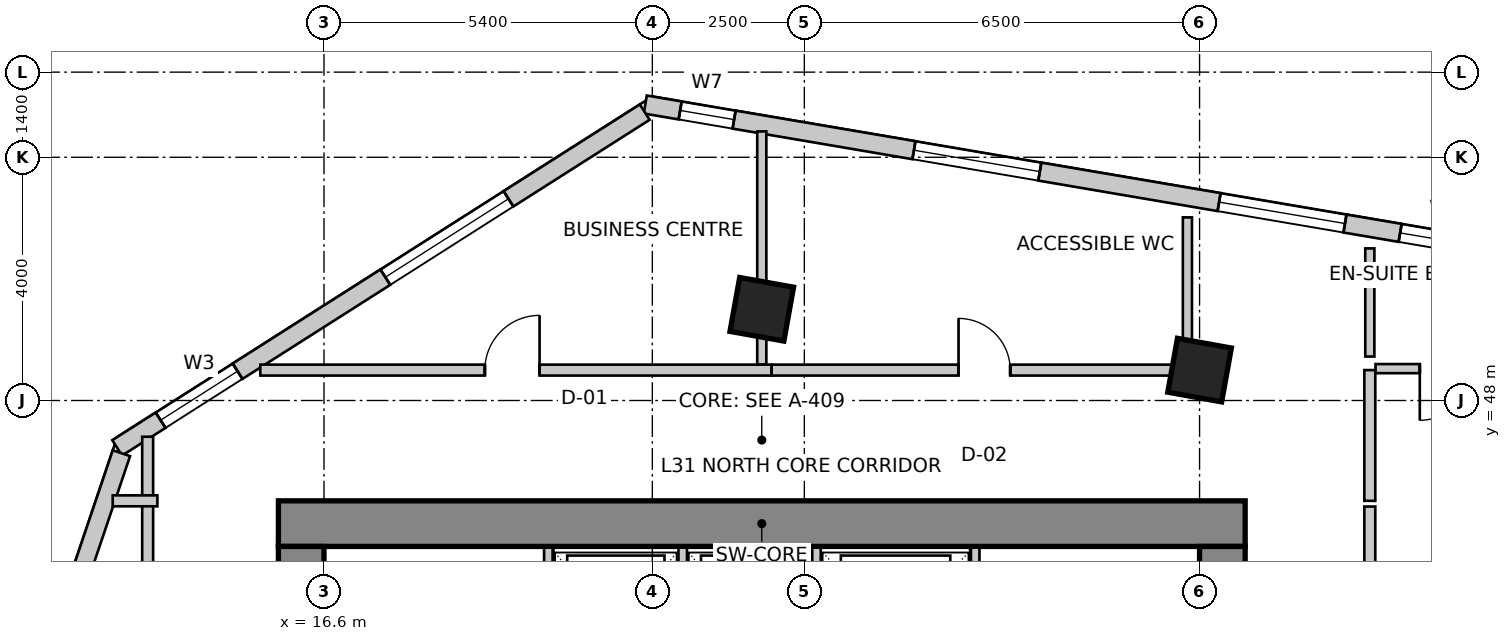
"""IFC4 building model, lengths in metres.
Left out: names, types, materials, properties, quantities, classifications, styles, units other than length and angle.
Written with IfcOpenShell. Run it as: python <this file> out.ifc"""

import sys

from ifc_helpers import new_model, si_unit, direction, frame, frame_2d, origin, origin_2d, place, context, subcontext, project, spatial, rectangle, extrude, source, transform, mapped, element, fill, save


model = new_model("IFC4")
c1 = context("Model", 3, precision=1e-05, world=origin(), true_north=direction((0.0, 1.0)))
c2 = subcontext(c1, "Body", "Model", "MODEL_VIEW")
j1 = project(units=[si_unit("LENGTHUNIT", "METRE"), si_unit("PLANEANGLEUNIT", "RADIAN")], contexts=[c1])
p1 = place(None, origin())
s1 = spatial("IfcSite", under=j1, at=p1, CompositionType="ELEMENT")
p2 = place(p1, origin())
s2 = spatial("IfcBuilding", under=s1, at=p2, CompositionType="ELEMENT")
p3 = place(p2, frame((0.0, 0.0, 128.6)))
s3 = spatial("IfcBuildingStorey", under=s2, at=p3, CompositionType="ELEMENT", Elevation=128.6)
p4 = place(p3, frame((15.85, 45.975, 0.0), z_axis=(0.0, 0.0, 1.0), x_axis=(1.0, 0.0, 0.0)))
e1 = element("IfcWall", 1, at=p4, inside=s3, PredefinedType="SHEAR", context=c2, shape_type="SweptSolid", body=[
    extrude(rectangle(XDim=15.9, YDim=0.75, at=frame_2d((7.95, 0.0))), origin(), (0.0, 0.0, 1.0), 3.6),
])
p5 = place(p3, frame((16.225, 34.2, 0.0), z_axis=(0.0, 0.0, 1.0), x_axis=(0.0, 1.0, 0.0)))
e2 = element("IfcWall", 2, at=p5, inside=s3, PredefinedType="SHEAR", context=c2, shape_type="SweptSolid", body=[
    extrude(rectangle(XDim=11.4, YDim=0.75, at=frame_2d((5.7, 0.0))), origin(), (0.0, 0.0, 1.0), 3.6),
])
m1 = source(origin(), c2, "Body", "SweptSolid", [
    extrude(rectangle(XDim=1.1, YDim=2.15, at=frame_2d((0.55, 1.075))), frame((0.0, 0.385, 0.0), z_axis=(0.0, -1.0, 0.0), x_axis=(1.0, 0.0, 0.0)), (0.0, 0.0, 1.0), 0.77),
])
p6 = place(p5, frame((7.15, 0.0, 0.0)))
e3 = element("IfcOpeningElement", 3, at=p6, cuts=e2, PredefinedType="OPENING", context=c2, shape_type="MappedRepresentation", body=[
    mapped(m1, transform((0.0, 0.0, 0.0), scale=1.0)),
])
p7 = place(p3, frame((31.375, 34.2, 0.0), z_axis=(0.0, 0.0, 1.0), x_axis=(0.0, 1.0, 0.0)))
e4 = element("IfcWall", 4, at=p7, inside=s3, PredefinedType="SHEAR", context=c2, shape_type="SweptSolid", body=[
    extrude(rectangle(XDim=11.4, YDim=0.75, at=frame_2d((5.7, 0.0))), origin(), (0.0, 0.0, 1.0), 3.6),
])
p8 = place(p7, frame((7.35, 0.0, 0.0)))
e5 = element("IfcOpeningElement", 5, at=p8, cuts=e4, PredefinedType="OPENING", context=c2, shape_type="MappedRepresentation", body=[
    mapped(m1, transform((0.0, 0.0, 0.0), scale=1.0)),
])
m2 = source(origin(), c2, "Body", "SweptSolid", [
    extrude(rectangle(XDim=0.9, YDim=0.9, at=origin_2d()), origin(), (0.0, 0.0, 1.0), 3.6),
])
for number, where, z_axis, x_axis in (
    (6, (23.8, 49.5, 0.0), (0.0, 0.0, 1.0), (0.984, -0.177, 0.0)),
    (7, (31.0, 48.5, 0.0), (0.0, 0.0, 1.0), (0.984, -0.177, 0.0)),
):
    element("IfcColumn", number, at=place(p3, frame(where, z_axis=z_axis, x_axis=x_axis)), inside=s3, PredefinedType="COLUMN", context=c2, shape_type="MappedRepresentation", body=[
        mapped(m2, transform((0.0, 0.0, 0.0), scale=1.0)),
    ])
p9 = place(p3, frame((53.561, 47.48, 0.0), z_axis=(0.0, 0.0, 1.0), x_axis=(-0.985845173895, 0.167658262868, 0.0)))
e8 = element("IfcWall", 8, at=p9, inside=s3, PredefinedType="SOLIDWALL", context=c2, shape_type="SweptSolid", body=[
    extrude(rectangle(XDim=32.132, YDim=0.3, at=frame_2d((16.066, 0.0))), origin(), (0.0, 0.0, 1.0), 3.35),
])
m3 = source(origin(), c2, "Body", "SweptSolid", [
    extrude(rectangle(XDim=2.1, YDim=2.0, at=frame_2d((1.05, 1.0))), frame((0.0, 0.16, 0.0), z_axis=(0.0, -1.0, 0.0), x_axis=(1.0, 0.0, 0.0)), (0.0, 0.0, 1.0), 0.32),
])
p10 = place(p9, frame((1.032, 0.0, 0.85)))
e9 = element("IfcOpeningElement", 9, at=p10, cuts=e8, PredefinedType="OPENING", context=c2, shape_type="MappedRepresentation", body=[
    mapped(m3, transform((0.0, 0.0, 0.0), scale=1.0)),
])
p11 = place(p9, frame((6.836, 0.0, 0.85)))
e10 = element("IfcOpeningElement", 10, at=p11, cuts=e8, PredefinedType="OPENING", context=c2, shape_type="MappedRepresentation", body=[
    mapped(m3, transform((0.0, 0.0, 0.0), scale=1.0)),
])
p12 = place(p9, frame((13.599, 0.0, 0.85)))
e11 = element("IfcOpeningElement", 11, at=p12, cuts=e8, PredefinedType="OPENING", context=c2, shape_type="MappedRepresentation", body=[
    mapped(m3, transform((0.0, 0.0, 0.0), scale=1.0)),
])
m4 = source(origin(), c2, "Body", "SweptSolid", [
    extrude(rectangle(XDim=1.5, YDim=1.8, at=frame_2d((0.75, 0.9))), frame((0.0, 0.16, 0.0), z_axis=(0.0, -1.0, 0.0), x_axis=(1.0, 0.0, 0.0)), (0.0, 0.0, 1.0), 0.32),
])
p13 = place(p9, frame((18.039, 0.0, 0.85)))
e12 = element("IfcOpeningElement", 12, at=p13, cuts=e8, PredefinedType="OPENING", context=c2, shape_type="MappedRepresentation", body=[
    mapped(m4, transform((0.0, 0.0, 0.0), scale=1.0)),
])
p14 = place(p9, frame((20.459, 0.0, 0.85)))
e13 = element("IfcOpeningElement", 13, at=p14, cuts=e8, PredefinedType="OPENING", context=c2, shape_type="MappedRepresentation", body=[
    mapped(m3, transform((0.0, 0.0, 0.0), scale=1.0)),
])
p15 = place(p9, frame((25.55, 0.0, 0.85)))
e14 = element("IfcOpeningElement", 14, at=p15, cuts=e8, PredefinedType="OPENING", context=c2, shape_type="MappedRepresentation", body=[
    mapped(m3, transform((0.0, 0.0, 0.0), scale=1.0)),
])
m5 = source(origin(), c2, "Body", "SweptSolid", [
    extrude(rectangle(XDim=0.9, YDim=1.6, at=frame_2d((0.45, 0.8))), frame((0.0, 0.16, 0.0), z_axis=(0.0, -1.0, 0.0), x_axis=(1.0, 0.0, 0.0)), (0.0, 0.0, 1.0), 0.32),
])
p16 = place(p9, frame((30.65, 0.0, 0.85)))
e15 = element("IfcOpeningElement", 15, at=p16, cuts=e8, PredefinedType="OPENING", context=c2, shape_type="MappedRepresentation", body=[
    mapped(m5, transform((0.0, 0.0, 0.0), scale=1.0)),
])
p17 = place(p3, frame((21.875, 52.742, 0.0), z_axis=(0.0, 0.0, 1.0), x_axis=(-0.843662465249, -0.536873956092, 0.0)))
e16 = element("IfcWall", 16, at=p17, inside=s3, PredefinedType="SOLIDWALL", context=c2, shape_type="SweptSolid", body=[
    extrude(rectangle(XDim=10.284, YDim=0.3, at=frame_2d((5.142, 0.0))), origin(), (0.0, 0.0, 1.0), 3.35),
])
m6 = source(origin(), c2, "Body", "SweptSolid", [
    extrude(rectangle(XDim=2.4, YDim=2.2, at=frame_2d((1.2, 1.1))), frame((0.0, 0.16, 0.0), z_axis=(0.0, -1.0, 0.0), x_axis=(1.0, 0.0, 0.0)), (0.0, 0.0, 1.0), 0.32),
])
p18 = place(p17, frame((2.656, 0.0, 0.85)))
e17 = element("IfcOpeningElement", 17, at=p18, cuts=e16, PredefinedType="OPENING", context=c2, shape_type="MappedRepresentation", body=[
    mapped(m6, transform((0.0, 0.0, 0.0), scale=1.0)),
])
p19 = place(p17, frame((7.937, 0.0, 0.85)))
e18 = element("IfcOpeningElement", 18, at=p19, cuts=e16, PredefinedType="OPENING", context=c2, shape_type="MappedRepresentation", body=[
    mapped(m4, transform((0.0, 0.0, 0.0), scale=1.0)),
])
p20 = place(p3, frame((13.269, 47.134, 0.0), z_axis=(0.0, 0.0, 1.0), x_axis=(-0.319929596295, -0.947441319246, 0.0)))
e19 = element("IfcWall", 19, at=p20, inside=s3, PredefinedType="SOLIDWALL", context=c2, shape_type="SweptSolid", body=[
    extrude(rectangle(XDim=16.134, YDim=0.3, at=frame_2d((8.067, 0.0))), origin(), (0.0, 0.0, 1.0), 3.35),
])
p21 = place(p20, frame((2.426, 0.0, 0.85)))
e20 = element("IfcOpeningElement", 20, at=p21, cuts=e19, PredefinedType="OPENING", context=c2, shape_type="MappedRepresentation", body=[
    mapped(m3, transform((0.0, 0.0, 0.0), scale=1.0)),
])
p22 = place(p20, frame((7.211, 0.0, 0.85)))
e21 = element("IfcOpeningElement", 21, at=p22, cuts=e19, PredefinedType="OPENING", context=c2, shape_type="MappedRepresentation", body=[
    mapped(m6, transform((0.0, 0.0, 0.0), scale=1.0)),
])
p23 = place(p20, frame((12.297, 0.0, 0.85)))
e22 = element("IfcOpeningElement", 22, at=p23, cuts=e19, PredefinedType="OPENING", context=c2, shape_type="MappedRepresentation", body=[
    mapped(m3, transform((0.0, 0.0, 0.0), scale=1.0)),
])
for number, where, z_axis, x_axis in (
    (23, (20.29, 43.28, 0.0), (0.0, 0.0, 1.0), (0.0, 1.0, 0.0)),
    (24, (27.31, 43.28, 0.0), (0.0, 0.0, 1.0), (0.0, 1.0, 0.0)),
):
    element("IfcWall", number, at=place(p3, frame(where, z_axis=z_axis, x_axis=x_axis)), inside=s3, PredefinedType="SOLIDWALL", context=c2, shape_type="SweptSolid", body=[
        extrude(rectangle(XDim=2.3, YDim=0.14, at=frame_2d((1.15, 0.0))), origin(), (0.0, 0.0, 1.0), 3.35),
    ])
for number, where, z_axis, x_axis in (
    (25, (22.5, 43.02, 0.0), (0.0, 0.0, 1.0), (0.0, 1.0, 0.0)),
    (26, (24.7, 43.02, 0.0), (0.0, 0.0, 1.0), (0.0, 1.0, 0.0)),
):
    element("IfcWall", number, at=place(p3, frame(where, z_axis=z_axis, x_axis=x_axis)), inside=s3, PredefinedType="SOLIDWALL", context=c2, shape_type="SweptSolid", body=[
        extrude(rectangle(XDim=2.56, YDim=0.14, at=frame_2d((1.28, 0.0))), origin(), (0.0, 0.0, 1.0), 3.35),
    ])
p24 = place(p3, frame((13.7, 33.544, 0.0), z_axis=(0.0, 0.0, 1.0), x_axis=(0.0, 1.0, 0.0)))
e27 = element("IfcWall", 27, at=p24, inside=s3, PredefinedType="PARTITIONING", context=c2, shape_type="SweptSolid", body=[
    extrude(rectangle(XDim=13.86, YDim=0.18, at=frame_2d((6.93, 0.0))), origin(), (0.0, 0.0, 1.0), 2.492),
])
m7 = source(origin(), c2, "Body", "SweptSolid", [
    extrude(rectangle(XDim=0.9, YDim=2.15, at=frame_2d((0.45, 1.075))), frame((0.0, 0.1, 0.0), z_axis=(0.0, -1.0, 0.0), x_axis=(1.0, 0.0, 0.0)), (0.0, 0.0, 1.0), 0.2),
])
p25 = place(p24, frame((4.253, 0.0, 0.0)))
e28 = element("IfcOpeningElement", 28, at=p25, cuts=e27, PredefinedType="OPENING", context=c2, shape_type="MappedRepresentation", body=[
    mapped(m7, transform((0.0, 0.0, 0.0), scale=1.0)),
])
p26 = place(p3, frame((13.86, 46.35, 0.0), z_axis=(0.0, 0.0, 1.0), x_axis=(-1.0, 0.0, 0.0)))
e29 = element("IfcWall", 29, at=p26, inside=s3, PredefinedType="PARTITIONING", context=c2, shape_type="SweptSolid", body=[
    extrude(rectangle(XDim=0.735, YDim=0.18, at=frame_2d((0.367, 0.0))), origin(), (0.0, 0.0, 1.0), 3.35),
])
p27 = place(p3, frame((15.552, 48.5, 0.0), z_axis=(0.0, 0.0, 1.0), x_axis=(1.0, 0.0, 0.0)))
e30 = element("IfcWall", 30, at=p27, inside=s3, PredefinedType="PARTITIONING", context=c2, shape_type="SweptSolid", body=[
    extrude(rectangle(XDim=8.407, YDim=0.18, at=frame_2d((4.204, 0.0))), origin(), (0.0, 0.0, 1.0), 3.019),
])
p28 = place(p27, frame((3.693, 0.0, 0.0)))
e31 = element("IfcOpeningElement", 31, at=p28, cuts=e30, PredefinedType="OPENING", context=c2, shape_type="MappedRepresentation", body=[
    mapped(m7, transform((0.0, 0.0, 0.0), scale=1.0)),
])
p29 = place(p3, frame((23.962, 48.5, 0.0), z_axis=(0.0, 0.0, 1.0), x_axis=(1.0, 0.0, 0.0)))
e32 = element("IfcWall", 32, at=p29, inside=s3, PredefinedType="PARTITIONING", context=c2, shape_type="SweptSolid", body=[
    extrude(rectangle(XDim=6.998, YDim=0.18, at=frame_2d((3.499, 0.0))), origin(), (0.0, 0.0, 1.0), 2.492),
])
m8 = source(origin(), c2, "Body", "SweptSolid", [
    extrude(rectangle(XDim=0.85, YDim=2.15, at=frame_2d((0.425, 1.075))), frame((0.0, 0.1, 0.0), z_axis=(0.0, -1.0, 0.0), x_axis=(1.0, 0.0, 0.0)), (0.0, 0.0, 1.0), 0.2),
])
p30 = place(p29, frame((3.074, 0.0, 0.0)))
e33 = element("IfcOpeningElement", 33, at=p30, cuts=e32, PredefinedType="OPENING", context=c2, shape_type="MappedRepresentation", body=[
    mapped(m8, transform((0.0, 0.0, 0.0), scale=1.0)),
])
p31 = place(p3, frame((33.8, 48.5, 0.0), z_axis=(0.0, 0.0, 1.0), x_axis=(0.0, -1.0, 0.0)))
e34 = element("IfcWall", 34, at=p31, inside=s3, PredefinedType="PARTITIONING", context=c2, shape_type="SweptSolid", body=[
    extrude(rectangle(XDim=2.15, YDim=0.18, at=frame_2d((1.075, 0.0))), origin(), (0.0, 0.0, 1.0), 2.492),
])
p32 = place(p3, frame((33.8, 46.256, 0.0), z_axis=(0.0, 0.0, 1.0), x_axis=(0.0, -1.0, 0.0)))
e35 = element("IfcWall", 35, at=p32, inside=s3, PredefinedType="PARTITIONING", context=c2, shape_type="SweptSolid", body=[
    extrude(rectangle(XDim=3.716, YDim=0.18, at=frame_2d((1.858, 0.0))), origin(), (0.0, 0.0, 1.0), 2.879),
])
p33 = place(p3, frame((23.8, 52.425, 0.0), z_axis=(0.0, 0.0, 1.0), x_axis=(0.0, -1.0, 0.0)))
e36 = element("IfcWall", 36, at=p33, inside=s3, PredefinedType="PARTITIONING", context=c2, shape_type="SweptSolid", body=[
    extrude(rectangle(XDim=3.831, YDim=0.15, at=frame_2d((1.916, 0.0))), origin(), (0.0, 0.0, 1.0), 2.492),
])
p34 = place(p3, frame((36.2, 48.524, 0.0), z_axis=(0.0, 0.0, 1.0), x_axis=(-1.0, 0.0, 0.0)))
e37 = element("IfcWall", 37, at=p34, inside=s3, PredefinedType="PARTITIONING", context=c2, shape_type="SweptSolid", body=[
    extrude(rectangle(XDim=2.306, YDim=0.15, at=frame_2d((1.153, 0.0))), origin(), (0.0, 0.0, 1.0), 3.35),
])
m9 = source(origin(), c2, "Body", "SweptSolid", [
    extrude(rectangle(XDim=0.85, YDim=2.15, at=frame_2d((0.425, 1.075))), frame((0.0, 0.085, 0.0), z_axis=(0.0, -1.0, 0.0), x_axis=(1.0, 0.0, 0.0)), (0.0, 0.0, 1.0), 0.17),
])
p35 = place(p34, frame((0.728, 0.0, 0.0)))
e38 = element("IfcOpeningElement", 38, at=p35, cuts=e37, PredefinedType="OPENING", context=c2, shape_type="MappedRepresentation", body=[
    mapped(m9, transform((0.0, 0.0, 0.0), scale=1.0)),
])
p36 = place(p3, frame((30.8, 51.011, 0.0), z_axis=(0.0, 0.0, 1.0), x_axis=(0.0, -1.0, 0.0)))
e39 = element("IfcWall", 39, at=p36, inside=s3, PredefinedType="PARTITIONING", context=c2, shape_type="SweptSolid", body=[
    extrude(rectangle(XDim=2.292, YDim=0.15, at=frame_2d((1.146, 0.0))), origin(), (0.0, 0.0, 1.0), 3.35),
])
p37 = place(p3, frame((33.8, 48.723, 0.0), z_axis=(0.0, 0.0, 1.0), x_axis=(0.0, 1.0, 0.0)))
e40 = element("IfcWall", 40, at=p37, inside=s3, PredefinedType="PARTITIONING", context=c2, shape_type="SweptSolid", body=[
    extrude(rectangle(XDim=1.778, YDim=0.15, at=frame_2d((0.889, 0.0))), origin(), (0.0, 0.0, 1.0), 3.35),
])
m10 = source(origin(), c2, "Body", "SweptSolid", [
    extrude(rectangle(XDim=1.5, YDim=1.8, at=frame_2d((0.75, 0.9))), frame((0.0, -0.015, 0.0), z_axis=(0.0, -1.0, 0.0), x_axis=(1.0, 0.0, 0.0)), (0.0, 0.0, 1.0), 0.06),
])
p38 = place(p13, origin())
e41 = element("IfcWindow", 41, at=p38, inside=s3, PartitioningType="SINGLE_PANEL", PredefinedType="WINDOW", context=c2, shape_type="MappedRepresentation", body=[
    mapped(m10, transform((0.0, 0.0, 0.0), scale=1.0)),
])
fill(e12, e41)
m11 = source(origin(), c2, "Body", "SweptSolid", [
    extrude(rectangle(XDim=2.1, YDim=2.0, at=frame_2d((1.05, 1.0))), frame((0.0, -0.015, 0.0), z_axis=(0.0, -1.0, 0.0), x_axis=(1.0, 0.0, 0.0)), (0.0, 0.0, 1.0), 0.06),
])
p39 = place(p14, origin())
e42 = element("IfcWindow", 42, at=p39, inside=s3, PartitioningType="SINGLE_PANEL", PredefinedType="WINDOW", context=c2, shape_type="MappedRepresentation", body=[
    mapped(m11, transform((0.0, 0.0, 0.0), scale=1.0)),
])
fill(e13, e42)
p40 = place(p15, origin())
e43 = element("IfcWindow", 43, at=p40, inside=s3, PartitioningType="SINGLE_PANEL", PredefinedType="WINDOW", context=c2, shape_type="MappedRepresentation", body=[
    mapped(m11, transform((0.0, 0.0, 0.0), scale=1.0)),
])
fill(e14, e43)
m12 = source(origin(), c2, "Body", "SweptSolid", [
    extrude(rectangle(XDim=0.9, YDim=1.6, at=frame_2d((0.45, 0.8))), frame((0.0, -0.015, 0.0), z_axis=(0.0, -1.0, 0.0), x_axis=(1.0, 0.0, 0.0)), (0.0, 0.0, 1.0), 0.06),
])
p41 = place(p16, origin())
e44 = element("IfcWindow", 44, at=p41, inside=s3, PartitioningType="SINGLE_PANEL", PredefinedType="WINDOW", context=c2, shape_type="MappedRepresentation", body=[
    mapped(m12, transform((0.0, 0.0, 0.0), scale=1.0)),
])
fill(e15, e44)
m13 = source(origin(), c2, "Body", "SweptSolid", [
    extrude(rectangle(XDim=2.4, YDim=2.2, at=frame_2d((1.2, 1.1))), frame((0.0, -0.015, 0.0), z_axis=(0.0, -1.0, 0.0), x_axis=(1.0, 0.0, 0.0)), (0.0, 0.0, 1.0), 0.06),
])
p42 = place(p18, origin())
e45 = element("IfcWindow", 45, at=p42, inside=s3, PartitioningType="SINGLE_PANEL", PredefinedType="WINDOW", context=c2, shape_type="MappedRepresentation", body=[
    mapped(m13, transform((0.0, 0.0, 0.0), scale=1.0)),
])
fill(e17, e45)
p43 = place(p19, origin())
e46 = element("IfcWindow", 46, at=p43, inside=s3, PartitioningType="SINGLE_PANEL", PredefinedType="WINDOW", context=c2, shape_type="MappedRepresentation", body=[
    mapped(m10, transform((0.0, 0.0, 0.0), scale=1.0)),
])
fill(e18, e46)
m14 = source(origin(), c2, "Body", "SweptSolid", [
    extrude(rectangle(XDim=0.9, YDim=2.15, at=frame_2d((0.45, 1.075))), frame((0.0, 0.025, 0.0), z_axis=(0.0, -1.0, 0.0), x_axis=(1.0, 0.0, 0.0)), (0.0, 0.0, 1.0), 0.05),
])
p44 = place(p28, origin())
e47 = element("IfcDoor", 47, at=p44, inside=s3, OperationType="SINGLE_SWING_RIGHT", PredefinedType="DOOR", context=c2, shape_type="MappedRepresentation", body=[
    mapped(m14, transform((0.0, 0.0, 0.0), scale=1.0)),
])
fill(e31, e47)
m15 = source(origin(), c2, "Body", "SweptSolid", [
    extrude(rectangle(XDim=0.85, YDim=2.15, at=frame_2d((0.425, 1.075))), frame((0.0, 0.025, 0.0), z_axis=(0.0, -1.0, 0.0), x_axis=(1.0, 0.0, 0.0)), (0.0, 0.0, 1.0), 0.05),
])
p45 = place(p30, origin())
e48 = element("IfcDoor", 48, at=p45, inside=s3, OperationType="SINGLE_SWING_LEFT", PredefinedType="DOOR", context=c2, shape_type="MappedRepresentation", body=[
    mapped(m15, transform((0.0, 0.0, 0.0), scale=1.0)),
])
fill(e33, e48)
p46 = place(p35, origin())
e49 = element("IfcDoor", 49, at=p46, inside=s3, OperationType="SINGLE_SWING_RIGHT", PredefinedType="DOOR", context=c2, shape_type="MappedRepresentation", body=[
    mapped(m15, transform((0.0, 0.0, 0.0), scale=1.0)),
])
fill(e38, e49)
save(model, sys.argv[1])
